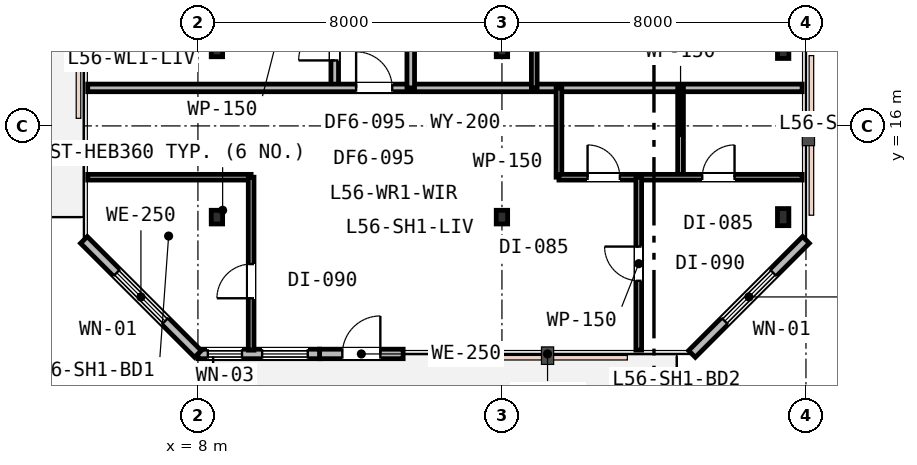
"""IFC4 building model, lengths in metres.
Left out: names, types, materials, properties, quantities, classifications, styles, units other than length and angle.
Written with IfcOpenShell. Run it as: python <this file> out.ifc"""

import sys

from ifc_helpers import new_model, si_unit, direction, frame, frame_2d, origin, origin_2d, place, context, subcontext, project, spatial, rectangle, i_section, extrude, element, fill, save


model = new_model("IFC4")
c1 = context("Model", 3, precision=1e-05, world=origin(), true_north=direction((0.0, 1.0)))
c2 = subcontext(c1, "Body", "Model", "MODEL_VIEW")
j1 = project(units=[si_unit("LENGTHUNIT", "METRE"), si_unit("PLANEANGLEUNIT", "RADIAN")], contexts=[c1])
p1 = place(None, origin())
s1 = spatial("IfcSite", under=j1, at=p1, CompositionType="ELEMENT")
p2 = place(p1, origin())
s2 = spatial("IfcBuilding", under=s1, at=p2, CompositionType="ELEMENT")
p3 = place(p2, frame((0.0, 0.0, 218.4)))
s3 = spatial("IfcBuildingStorey", under=s2, at=p3, CompositionType="ELEMENT", Elevation=218.4)
for number, where, z_axis, x_axis in (
    (1, (23.4, 13.6, 0.0), (0.0, 0.0, 1.0), (1.0, 0.0, 0.0)),
    (2, (23.4, 18.0, 0.0), (0.0, 0.0, 1.0), (1.0, 0.0, 0.0)),
):
    element("IfcColumn", number, at=place(p3, frame(where, z_axis=z_axis, x_axis=x_axis)), inside=s3, PredefinedType="COLUMN", context=c2, shape_type="SweptSolid", body=[
        extrude(i_section(OverallWidth=0.3, OverallDepth=0.45, WebThickness=0.014, FlangeThickness=0.026, FilletRadius=0.027, at=origin_2d()), origin(), (0.0, 0.0, 1.0), 3.8),
    ])
for number, where, z_axis, x_axis in (
    (3, (8.5, 13.6, 0.0), (0.0, 0.0, 1.0), (1.0, 0.0, 0.0)),
    (4, (16.0, 13.6, 0.0), (0.0, 0.0, 1.0), (1.0, 0.0, 0.0)),
    (5, (8.5, 18.0, 0.0), (0.0, 0.0, 1.0), (1.0, 0.0, 0.0)),
    (6, (16.0, 18.0, 0.0), (0.0, 0.0, 1.0), (1.0, 0.0, 0.0)),
):
    element("IfcColumn", number, at=place(p3, frame(where, z_axis=z_axis, x_axis=x_axis)), inside=s3, PredefinedType="COLUMN", context=c2, shape_type="SweptSolid", body=[
        extrude(i_section(OverallWidth=0.3, OverallDepth=0.36, WebThickness=0.013, FlangeThickness=0.022, FilletRadius=0.027, at=origin_2d()), origin(), (0.0, 0.0, 1.0), 3.8),
    ])
p4 = place(p3, frame((11.2, 10.0, 0.0), z_axis=(0.0, 0.0, 1.0), x_axis=(1.0, 0.0, 0.0)))
e7 = element("IfcWall", 7, at=p4, inside=s3, PredefinedType="STANDARD", context=c2, shape_type="SweptSolid", body=[
    extrude(rectangle(XDim=2.2, YDim=0.25, at=frame_2d((1.1, 0.0))), origin(), (0.0, 0.0, 1.0), 3.53),
])
p5 = place(p4, frame((0.6, 0.0, 0.0)))
e8 = element("IfcOpeningElement", 8, at=p5, cuts=e7, PredefinedType="OPENING", context=c2, shape_type="SweptSolid", body=[
    extrude(rectangle(XDim=1.0, YDim=2.15, at=frame_2d((0.5, 1.075))), frame((0.0, 0.135, 0.0), z_axis=(0.0, -1.0, 0.0), x_axis=(1.0, 0.0, 0.0)), (0.0, 0.0, 1.0), 0.27),
])
p6 = place(p3, frame((8.0, 10.0, 0.0), z_axis=(0.0, 0.0, 1.0), x_axis=(1.0, 0.0, 0.0)))
e9 = element("IfcWall", 9, at=p6, inside=s3, PredefinedType="STANDARD", context=c2, shape_type="SweptSolid", body=[
    extrude(rectangle(XDim=3.2, YDim=0.25, at=frame_2d((1.6, 0.0))), origin(), (0.0, 0.0, 1.0), 3.53),
])
p7 = place(p6, frame((0.26, 0.0, 0.9)))
e10 = element("IfcOpeningElement", 10, at=p7, cuts=e9, PredefinedType="OPENING", context=c2, shape_type="SweptSolid", body=[
    extrude(rectangle(XDim=0.9, YDim=1.55, at=frame_2d((0.45, 0.775))), frame((0.0, 0.135, 0.0), z_axis=(0.0, -1.0, 0.0), x_axis=(1.0, 0.0, 0.0)), (0.0, 0.0, 1.0), 0.27),
])
p8 = place(p6, frame((1.69, 0.0, 0.85)))
e11 = element("IfcOpeningElement", 11, at=p8, cuts=e9, PredefinedType="OPENING", context=c2, shape_type="SweptSolid", body=[
    extrude(rectangle(XDim=1.2, YDim=1.6, at=frame_2d((0.6, 0.8))), frame((0.0, 0.135, 0.0), z_axis=(0.0, -1.0, 0.0), x_axis=(1.0, 0.0, 0.0)), (0.0, 0.0, 1.0), 0.27),
])
p9 = place(p3, frame((21.0, 10.0, 0.0), z_axis=(0.0, 0.0, 1.0), x_axis=(0.707106781187, 0.707106781187, 0.0)))
e12 = element("IfcWall", 12, at=p9, inside=s3, PredefinedType="STANDARD", context=c2, shape_type="SweptSolid", body=[
    extrude(rectangle(XDim=4.243, YDim=0.25, at=frame_2d((2.121, 0.0))), origin(), (0.0, 0.0, 1.0), 3.53),
])
p10 = place(p9, frame((1.221, 0.0, 0.75)))
e13 = element("IfcOpeningElement", 13, at=p10, cuts=e12, PredefinedType="OPENING", context=c2, shape_type="SweptSolid", body=[
    extrude(rectangle(XDim=1.8, YDim=1.85, at=frame_2d((0.9, 0.925))), frame((0.0, 0.135, 0.0), z_axis=(0.0, -1.0, 0.0), x_axis=(1.0, 0.0, 0.0)), (0.0, 0.0, 1.0), 0.27),
])
p11 = place(p3, frame((5.0, 13.0, 0.0), z_axis=(0.0, 0.0, 1.0), x_axis=(0.707106781187, -0.707106781187, 0.0)))
e14 = element("IfcWall", 14, at=p11, inside=s3, PredefinedType="STANDARD", context=c2, shape_type="SweptSolid", body=[
    extrude(rectangle(XDim=4.243, YDim=0.25, at=frame_2d((2.121, 0.0))), origin(), (0.0, 0.0, 1.0), 3.53),
])
p12 = place(p11, frame((1.221, 0.0, 0.75)))
e15 = element("IfcOpeningElement", 15, at=p12, cuts=e14, PredefinedType="OPENING", context=c2, shape_type="SweptSolid", body=[
    extrude(rectangle(XDim=1.8, YDim=1.85, at=frame_2d((0.9, 0.925))), frame((0.0, 0.135, 0.0), z_axis=(0.0, -1.0, 0.0), x_axis=(1.0, 0.0, 0.0)), (0.0, 0.0, 1.0), 0.27),
])
p13 = place(p3, frame((11.6, 17.0, 0.0), z_axis=(0.0, 0.0, 1.0), x_axis=(0.0, 1.0, 0.0)))
e16 = element("IfcWall", 16, at=p13, inside=s3, PredefinedType="PARTITIONING", context=c2, shape_type="SweptSolid", body=[
    extrude(rectangle(XDim=25.9, YDim=0.2, at=frame_2d((12.95, 0.0))), origin(), (0.0, 0.0, 1.0), 2.92),
])
p14 = place(p13, frame((12.225, 0.0, 0.0)))
e17 = element("IfcOpeningElement", 17, at=p14, cuts=e16, PredefinedType="OPENING", context=c2, shape_type="SweptSolid", body=[
    extrude(rectangle(XDim=0.95, YDim=2.15, at=frame_2d((0.475, 1.075))), frame((0.0, 0.11, 0.0), z_axis=(0.0, -1.0, 0.0), x_axis=(1.0, 0.0, 0.0)), (0.0, 0.0, 1.0), 0.22),
])
p15 = place(p13, frame((0.723, 0.0, 0.0)))
e18 = element("IfcOpeningElement", 18, at=p15, cuts=e16, PredefinedType="OPENING", context=c2, shape_type="SweptSolid", body=[
    extrude(rectangle(XDim=0.95, YDim=2.15, at=frame_2d((0.475, 1.075))), frame((0.0, 0.11, 0.0), z_axis=(0.0, -1.0, 0.0), x_axis=(1.0, 0.0, 0.0)), (0.0, 0.0, 1.0), 0.22),
])
p16 = place(p3, frame((5.1, 17.0, 0.0), z_axis=(0.0, 0.0, 1.0), x_axis=(1.0, 0.0, 0.0)))
e19 = element("IfcWall", 19, at=p16, inside=s3, PredefinedType="PARTITIONING", context=c2, shape_type="SweptSolid", body=[
    extrude(rectangle(XDim=18.8, YDim=0.2, at=frame_2d((9.4, 0.0))), origin(), (0.0, 0.0, 1.0), 2.92),
])
p17 = place(p16, frame((7.063, 0.0, 0.0)))
e20 = element("IfcOpeningElement", 20, at=p17, cuts=e19, PredefinedType="OPENING", context=c2, shape_type="SweptSolid", body=[
    extrude(rectangle(XDim=0.95, YDim=2.15, at=frame_2d((0.475, 1.075))), frame((0.0, 0.11, 0.0), z_axis=(0.0, -1.0, 0.0), x_axis=(1.0, 0.0, 0.0)), (0.0, 0.0, 1.0), 0.22),
])
p18 = place(p3, frame((13.6, 17.0, 0.0), z_axis=(0.0, 0.0, 1.0), x_axis=(0.0, 1.0, 0.0)))
e21 = element("IfcWall", 21, at=p18, inside=s3, PredefinedType="PARTITIONING", context=c2, shape_type="SweptSolid", body=[
    extrude(rectangle(XDim=11.6, YDim=0.2, at=frame_2d((5.8, 0.0))), origin(), (0.0, 0.0, 1.0), 2.92),
])
p19 = place(p18, frame((10.225, 0.0, 0.0)))
e22 = element("IfcOpeningElement", 22, at=p19, cuts=e21, PredefinedType="OPENING", context=c2, shape_type="SweptSolid", body=[
    extrude(rectangle(XDim=0.95, YDim=2.15, at=frame_2d((0.475, 1.075))), frame((0.0, 0.11, 0.0), z_axis=(0.0, -1.0, 0.0), x_axis=(1.0, 0.0, 0.0)), (0.0, 0.0, 1.0), 0.22),
])
p20 = place(p3, frame((16.85, 17.0, 0.0), z_axis=(0.0, 0.0, 1.0), x_axis=(0.0, 1.0, 0.0)))
e23 = element("IfcWall", 23, at=p20, inside=s3, PredefinedType="PARTITIONING", context=c2, shape_type="SweptSolid", body=[
    extrude(rectangle(XDim=9.8, YDim=0.15, at=frame_2d((4.9, 0.0))), origin(), (0.0, 0.0, 1.0), 2.92),
])
p21 = place(p20, frame((5.598, 0.0, 0.0)))
e24 = element("IfcOpeningElement", 24, at=p21, cuts=e23, PredefinedType="OPENING", context=c2, shape_type="SweptSolid", body=[
    extrude(rectangle(XDim=0.85, YDim=2.15, at=frame_2d((0.425, 1.075))), frame((0.0, 0.085, 0.0), z_axis=(0.0, -1.0, 0.0), x_axis=(1.0, 0.0, 0.0)), (0.0, 0.0, 1.0), 0.17),
])
p22 = place(p20, frame((8.496, 0.0, 0.0)))
e25 = element("IfcOpeningElement", 25, at=p22, cuts=e23, PredefinedType="OPENING", context=c2, shape_type="SweptSolid", body=[
    extrude(rectangle(XDim=0.85, YDim=2.15, at=frame_2d((0.425, 1.075))), frame((0.0, 0.085, 0.0), z_axis=(0.0, -1.0, 0.0), x_axis=(1.0, 0.0, 0.0)), (0.0, 0.0, 1.0), 0.17),
])
p23 = place(p20, frame((2.268, 0.0, 0.0)))
e26 = element("IfcOpeningElement", 26, at=p23, cuts=e23, PredefinedType="OPENING", context=c2, shape_type="SweptSolid", body=[
    extrude(rectangle(XDim=0.85, YDim=2.15, at=frame_2d((0.425, 1.075))), frame((0.0, 0.085, 0.0), z_axis=(0.0, -1.0, 0.0), x_axis=(1.0, 0.0, 0.0)), (0.0, 0.0, 1.0), 0.17),
])
p24 = place(p3, frame((17.5, 14.65, 0.0), z_axis=(0.0, 0.0, 1.0), x_axis=(0.0, 1.0, 0.0)))
e27 = element("IfcWall", 27, at=p24, inside=s3, PredefinedType="PARTITIONING", context=c2, shape_type="SweptSolid", body=[
    extrude(rectangle(XDim=2.35, YDim=0.15, at=frame_2d((1.175, 0.0))), origin(), (0.0, 0.0, 1.0), 3.53),
])
p25 = place(p3, frame((20.7, 14.65, 0.0), z_axis=(0.0, 0.0, 1.0), x_axis=(0.0, 1.0, 0.0)))
e28 = element("IfcWall", 28, at=p25, inside=s3, PredefinedType="PARTITIONING", context=c2, shape_type="SweptSolid", body=[
    extrude(rectangle(XDim=2.35, YDim=0.15, at=frame_2d((1.175, 0.0))), origin(), (0.0, 0.0, 1.0), 3.22),
])
p26 = place(p3, frame((17.5, 14.65, 0.0), z_axis=(0.0, 0.0, 1.0), x_axis=(1.0, 0.0, 0.0)))
e29 = element("IfcWall", 29, at=p26, inside=s3, PredefinedType="PARTITIONING", context=c2, shape_type="SweptSolid", body=[
    extrude(rectangle(XDim=6.4, YDim=0.15, at=frame_2d((3.2, 0.0))), origin(), (0.0, 0.0, 1.0), 3.22),
])
p27 = place(p26, frame((0.753, 0.0, 0.0)))
e30 = element("IfcOpeningElement", 30, at=p27, cuts=e29, PredefinedType="OPENING", context=c2, shape_type="SweptSolid", body=[
    extrude(rectangle(XDim=0.85, YDim=2.15, at=frame_2d((0.425, 1.075))), frame((0.0, 0.085, 0.0), z_axis=(0.0, -1.0, 0.0), x_axis=(1.0, 0.0, 0.0)), (0.0, 0.0, 1.0), 0.17),
])
p28 = place(p26, frame((3.771, 0.0, 0.0)))
e31 = element("IfcOpeningElement", 31, at=p28, cuts=e29, PredefinedType="OPENING", context=c2, shape_type="SweptSolid", body=[
    extrude(rectangle(XDim=0.85, YDim=2.15, at=frame_2d((0.425, 1.075))), frame((0.0, 0.085, 0.0), z_axis=(0.0, -1.0, 0.0), x_axis=(1.0, 0.0, 0.0)), (0.0, 0.0, 1.0), 0.17),
])
p29 = place(p3, frame((5.1, 14.65, 0.0), z_axis=(0.0, 0.0, 1.0), x_axis=(1.0, 0.0, 0.0)))
e32 = element("IfcWall", 32, at=p29, inside=s3, PredefinedType="PARTITIONING", context=c2, shape_type="SweptSolid", body=[
    extrude(rectangle(XDim=4.3, YDim=0.15, at=frame_2d((2.15, 0.0))), origin(), (0.0, 0.0, 1.0), 2.92),
])
p30 = place(p3, frame((9.4, 10.1, 0.0), z_axis=(0.0, 0.0, 1.0), x_axis=(0.0, 1.0, 0.0)))
e33 = element("IfcWall", 33, at=p30, inside=s3, PredefinedType="PARTITIONING", context=c2, shape_type="SweptSolid", body=[
    extrude(rectangle(XDim=4.55, YDim=0.15, at=frame_2d((2.275, 0.0))), origin(), (0.0, 0.0, 1.0), 2.92),
])
p31 = place(p30, frame((1.365, 0.0, 0.0)))
e34 = element("IfcOpeningElement", 34, at=p31, cuts=e33, PredefinedType="OPENING", context=c2, shape_type="SweptSolid", body=[
    extrude(rectangle(XDim=0.9, YDim=2.15, at=frame_2d((0.45, 1.075))), frame((0.0, 0.085, 0.0), z_axis=(0.0, -1.0, 0.0), x_axis=(1.0, 0.0, 0.0)), (0.0, 0.0, 1.0), 0.17),
])
p32 = place(p3, frame((19.6, 10.1, 0.0), z_axis=(0.0, 0.0, 1.0), x_axis=(0.0, 1.0, 0.0)))
e35 = element("IfcWall", 35, at=p32, inside=s3, PredefinedType="PARTITIONING", context=c2, shape_type="SweptSolid", body=[
    extrude(rectangle(XDim=4.55, YDim=0.15, at=frame_2d((2.275, 0.0))), origin(), (0.0, 0.0, 1.0), 2.92),
])
p33 = place(p32, frame((1.825, 0.0, 0.0)))
e36 = element("IfcOpeningElement", 36, at=p33, cuts=e35, PredefinedType="OPENING", context=c2, shape_type="SweptSolid", body=[
    extrude(rectangle(XDim=0.9, YDim=2.15, at=frame_2d((0.45, 1.075))), frame((0.0, 0.085, 0.0), z_axis=(0.0, -1.0, 0.0), x_axis=(1.0, 0.0, 0.0)), (0.0, 0.0, 1.0), 0.17),
])
p34 = place(p5, origin())
e37 = element("IfcDoor", 37, at=p34, inside=s3, OperationType="SINGLE_SWING_RIGHT", PredefinedType="DOOR", context=c2, shape_type="SweptSolid", body=[
    extrude(rectangle(XDim=1.0, YDim=2.15, at=frame_2d((0.5, 1.075))), frame((0.0, 0.025, 0.0), z_axis=(0.0, -1.0, 0.0), x_axis=(1.0, 0.0, 0.0)), (0.0, 0.0, 1.0), 0.05),
])
fill(e8, e37)
p35 = place(p7, origin())
e38 = element("IfcWindow", 38, at=p35, inside=s3, PartitioningType="SINGLE_PANEL", PredefinedType="WINDOW", context=c2, shape_type="SweptSolid", body=[
    extrude(rectangle(XDim=0.9, YDim=1.55, at=frame_2d((0.45, 0.775))), frame((0.0, 0.03, 0.0), z_axis=(0.0, -1.0, 0.0), x_axis=(1.0, 0.0, 0.0)), (0.0, 0.0, 1.0), 0.06),
])
fill(e10, e38)
p36 = place(p8, origin())
e39 = element("IfcWindow", 39, at=p36, inside=s3, PartitioningType="SINGLE_PANEL", PredefinedType="WINDOW", context=c2, shape_type="SweptSolid", body=[
    extrude(rectangle(XDim=1.2, YDim=1.6, at=frame_2d((0.6, 0.8))), frame((0.0, 0.03, 0.0), z_axis=(0.0, -1.0, 0.0), x_axis=(1.0, 0.0, 0.0)), (0.0, 0.0, 1.0), 0.06),
])
fill(e11, e39)
p37 = place(p10, origin())
e40 = element("IfcWindow", 40, at=p37, inside=s3, PartitioningType="SINGLE_PANEL", PredefinedType="WINDOW", context=c2, shape_type="SweptSolid", body=[
    extrude(rectangle(XDim=1.8, YDim=1.85, at=frame_2d((0.9, 0.925))), frame((0.0, 0.03, 0.0), z_axis=(0.0, -1.0, 0.0), x_axis=(1.0, 0.0, 0.0)), (0.0, 0.0, 1.0), 0.06),
])
fill(e13, e40)
p38 = place(p12, origin())
e41 = element("IfcWindow", 41, at=p38, inside=s3, PartitioningType="SINGLE_PANEL", PredefinedType="WINDOW", context=c2, shape_type="SweptSolid", body=[
    extrude(rectangle(XDim=1.8, YDim=1.85, at=frame_2d((0.9, 0.925))), frame((0.0, 0.03, 0.0), z_axis=(0.0, -1.0, 0.0), x_axis=(1.0, 0.0, 0.0)), (0.0, 0.0, 1.0), 0.06),
])
fill(e15, e41)
p39 = place(p15, origin())
e42 = element("IfcDoor", 42, at=p39, inside=s3, OperationType="SINGLE_SWING_LEFT", PredefinedType="DOOR", context=c2, shape_type="SweptSolid", body=[
    extrude(rectangle(XDim=0.95, YDim=2.15, at=frame_2d((0.475, 1.075))), frame((0.0, 0.025, 0.0), z_axis=(0.0, -1.0, 0.0), x_axis=(1.0, 0.0, 0.0)), (0.0, 0.0, 1.0), 0.05),
])
fill(e18, e42)
p40 = place(p17, origin())
e43 = element("IfcDoor", 43, at=p40, inside=s3, OperationType="SINGLE_SWING_LEFT", PredefinedType="DOOR", context=c2, shape_type="SweptSolid", body=[
    extrude(rectangle(XDim=0.95, YDim=2.15, at=frame_2d((0.475, 1.075))), frame((0.0, 0.025, 0.0), z_axis=(0.0, -1.0, 0.0), x_axis=(1.0, 0.0, 0.0)), (0.0, 0.0, 1.0), 0.05),
])
fill(e20, e43)
p41 = place(p27, origin())
e44 = element("IfcDoor", 44, at=p41, inside=s3, OperationType="SINGLE_SWING_LEFT", PredefinedType="DOOR", context=c2, shape_type="SweptSolid", body=[
    extrude(rectangle(XDim=0.85, YDim=2.15, at=frame_2d((0.425, 1.075))), frame((0.0, 0.025, 0.0), z_axis=(0.0, -1.0, 0.0), x_axis=(1.0, 0.0, 0.0)), (0.0, 0.0, 1.0), 0.05),
])
fill(e30, e44)
p42 = place(p28, origin())
e45 = element("IfcDoor", 45, at=p42, inside=s3, OperationType="SINGLE_SWING_RIGHT", PredefinedType="DOOR", context=c2, shape_type="SweptSolid", body=[
    extrude(rectangle(XDim=0.85, YDim=2.15, at=frame_2d((0.425, 1.075))), frame((0.0, 0.025, 0.0), z_axis=(0.0, -1.0, 0.0), x_axis=(1.0, 0.0, 0.0)), (0.0, 0.0, 1.0), 0.05),
])
fill(e31, e45)
p43 = place(p31, origin())
e46 = element("IfcDoor", 46, at=p43, inside=s3, OperationType="SINGLE_SWING_LEFT", PredefinedType="DOOR", context=c2, shape_type="SweptSolid", body=[
    extrude(rectangle(XDim=0.9, YDim=2.15, at=frame_2d((0.45, 1.075))), frame((0.0, 0.025, 0.0), z_axis=(0.0, -1.0, 0.0), x_axis=(1.0, 0.0, 0.0)), (0.0, 0.0, 1.0), 0.05),
])
fill(e34, e46)
p44 = place(p33, origin())
e47 = element("IfcDoor", 47, at=p44, inside=s3, OperationType="SINGLE_SWING_RIGHT", PredefinedType="DOOR", context=c2, shape_type="SweptSolid", body=[
    extrude(rectangle(XDim=0.9, YDim=2.15, at=frame_2d((0.45, 1.075))), frame((0.0, 0.025, 0.0), z_axis=(0.0, -1.0, 0.0), x_axis=(1.0, 0.0, 0.0)), (0.0, 0.0, 1.0), 0.05),
])
fill(e36, e47)
save(model, sys.argv[1])
